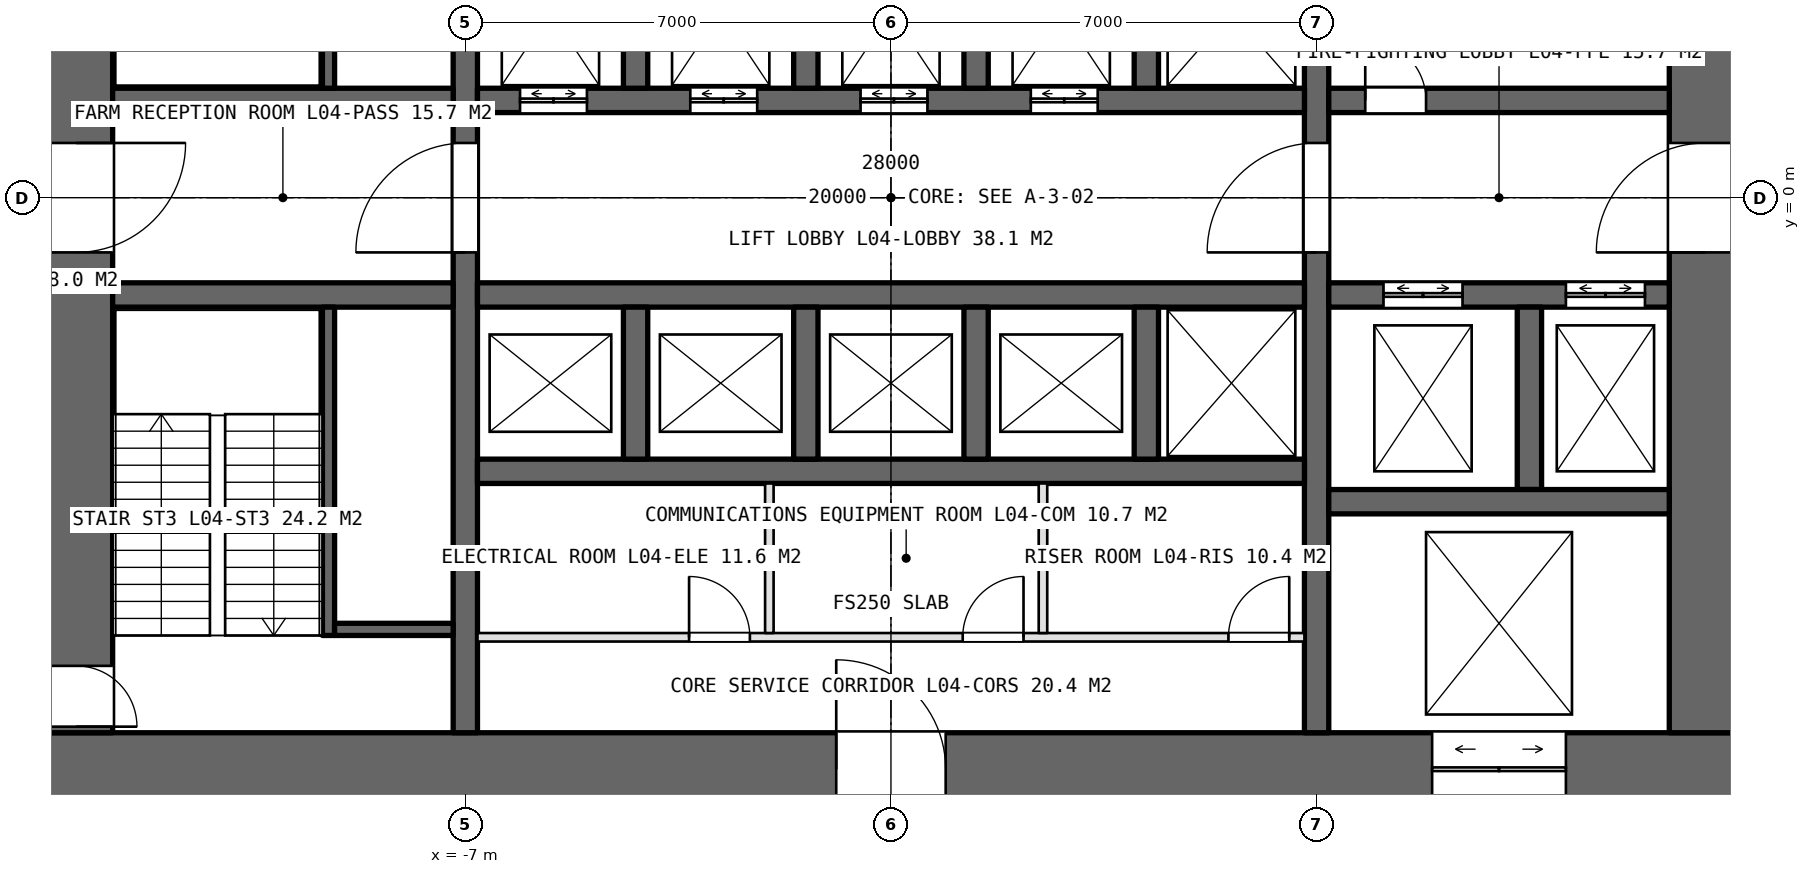
"""IFC4 building model, lengths in metres.
Left out: names, types, materials, properties, quantities, classifications, styles, units other than length and angle.
Written with IfcOpenShell. Run it as: python <this file> out.ifc"""

import sys

from ifc_helpers import new_model, si_unit, direction, frame, frame_2d, origin, place, context, subcontext, project, spatial, rectangle, extrude, element, fill, save


model = new_model("IFC4")
c1 = context("Model", 3, precision=1e-05, world=origin(), true_north=direction((0.0, 1.0)))
c2 = subcontext(c1, "Body", "Model", "MODEL_VIEW")
j1 = project(units=[si_unit("LENGTHUNIT", "METRE"), si_unit("PLANEANGLEUNIT", "RADIAN")], contexts=[c1])
p1 = place(None, origin())
s1 = spatial("IfcSite", under=j1, at=p1, CompositionType="ELEMENT")
p2 = place(p1, origin())
s2 = spatial("IfcBuilding", under=s1, at=p2, CompositionType="ELEMENT")
p3 = place(p2, frame((0.0, 0.0, 20.0)))
s3 = spatial("IfcBuildingStorey", under=s2, at=p3, CompositionType="ELEMENT", Elevation=20.0)
p4 = place(p3, frame((-14.0, -9.4, 0.0), z_axis=(0.0, 0.0, 1.0), x_axis=(1.0, 0.0, 0.0)))
e1 = element("IfcWall", 1, at=p4, inside=s3, PredefinedType="SHEAR", context=c2, shape_type="SweptSolid", body=[
    extrude(rectangle(XDim=28.0, YDim=1.2, at=frame_2d((14.0, 0.0))), origin(), (0.0, 0.0, 1.0), 5.0),
])
p5 = place(p4, frame((13.1, 0.0, 0.0)))
e2 = element("IfcOpeningElement", 2, at=p5, cuts=e1, PredefinedType="OPENING", context=c2, shape_type="SweptSolid", body=[
    extrude(rectangle(XDim=1.8, YDim=2.4, at=frame_2d((0.9, 1.2))), frame((0.0, 0.61, 0.0), z_axis=(0.0, -1.0, 0.0), x_axis=(1.0, 0.0, 0.0)), (0.0, 0.0, 1.0), 1.22),
])
p6 = place(p4, frame((22.9, 0.0, 0.0)))
e3 = element("IfcOpeningElement", 3, at=p6, cuts=e1, PredefinedType="OPENING", context=c2, shape_type="SweptSolid", body=[
    extrude(rectangle(XDim=2.2, YDim=2.7, at=frame_2d((1.1, 1.35))), frame((0.0, 0.61, 0.0), z_axis=(0.0, -1.0, 0.0), x_axis=(1.0, 0.0, 0.0)), (0.0, 0.0, 1.0), 1.22),
])
p7 = place(p3, frame((-13.4, 8.8, 0.0), z_axis=(0.0, 0.0, 1.0), x_axis=(0.0, -1.0, 0.0)))
e4 = element("IfcWall", 4, at=p7, inside=s3, PredefinedType="SHEAR", context=c2, shape_type="SweptSolid", body=[
    extrude(rectangle(XDim=17.6, YDim=1.2, at=frame_2d((8.8, 0.0))), origin(), (0.0, 0.0, 1.0), 5.0),
])
p8 = place(p7, frame((7.9, 0.0, 0.0)))
e5 = element("IfcOpeningElement", 5, at=p8, cuts=e4, PredefinedType="OPENING", context=c2, shape_type="SweptSolid", body=[
    extrude(rectangle(XDim=1.8, YDim=2.4, at=frame_2d((0.9, 1.2))), frame((0.0, 0.61, 0.0), z_axis=(0.0, -1.0, 0.0), x_axis=(1.0, 0.0, 0.0)), (0.0, 0.0, 1.0), 1.22),
])
p9 = place(p7, frame((16.5, 0.0, 0.0)))
e6 = element("IfcOpeningElement", 6, at=p9, cuts=e4, PredefinedType="OPENING", context=c2, shape_type="SweptSolid", body=[
    extrude(rectangle(XDim=1.0, YDim=2.4, at=frame_2d((0.5, 1.2))), frame((0.0, 0.61, 0.0), z_axis=(0.0, -1.0, 0.0), x_axis=(1.0, 0.0, 0.0)), (0.0, 0.0, 1.0), 1.22),
])
p10 = place(p3, frame((13.4, -8.8, 0.0), z_axis=(0.0, 0.0, 1.0), x_axis=(0.0, 1.0, 0.0)))
e7 = element("IfcWall", 7, at=p10, inside=s3, PredefinedType="SHEAR", context=c2, shape_type="SweptSolid", body=[
    extrude(rectangle(XDim=17.6, YDim=1.2, at=frame_2d((8.8, 0.0))), origin(), (0.0, 0.0, 1.0), 5.0),
])
p11 = place(p10, frame((7.9, 0.0, 0.0)))
e8 = element("IfcOpeningElement", 8, at=p11, cuts=e7, PredefinedType="OPENING", context=c2, shape_type="SweptSolid", body=[
    extrude(rectangle(XDim=1.8, YDim=2.4, at=frame_2d((0.9, 1.2))), frame((0.0, 0.61, 0.0), z_axis=(0.0, -1.0, 0.0), x_axis=(1.0, 0.0, 0.0)), (0.0, 0.0, 1.0), 1.22),
])
p12 = place(p3, frame((-7.0, -8.8, 0.0), z_axis=(0.0, 0.0, 1.0), x_axis=(0.0, 1.0, 0.0)))
e9 = element("IfcWall", 9, at=p12, inside=s3, PredefinedType="SHEAR", context=c2, shape_type="SweptSolid", body=[
    extrude(rectangle(XDim=17.6, YDim=0.4, at=frame_2d((8.8, 0.0))), origin(), (0.0, 0.0, 1.0), 5.0),
])
p13 = place(p12, frame((7.9, 0.0, 0.0)))
e10 = element("IfcOpeningElement", 10, at=p13, cuts=e9, PredefinedType="OPENING", context=c2, shape_type="SweptSolid", body=[
    extrude(rectangle(XDim=1.8, YDim=2.4, at=frame_2d((0.9, 1.2))), frame((0.0, 0.21, 0.0), z_axis=(0.0, -1.0, 0.0), x_axis=(1.0, 0.0, 0.0)), (0.0, 0.0, 1.0), 0.42),
])
p14 = place(p3, frame((7.0, -8.8, 0.0), z_axis=(0.0, 0.0, 1.0), x_axis=(0.0, 1.0, 0.0)))
e11 = element("IfcWall", 11, at=p14, inside=s3, PredefinedType="SHEAR", context=c2, shape_type="SweptSolid", body=[
    extrude(rectangle(XDim=17.6, YDim=0.4, at=frame_2d((8.8, 0.0))), origin(), (0.0, 0.0, 1.0), 5.0),
])
p15 = place(p14, frame((7.9, 0.0, 0.0)))
e12 = element("IfcOpeningElement", 12, at=p15, cuts=e11, PredefinedType="OPENING", context=c2, shape_type="SweptSolid", body=[
    extrude(rectangle(XDim=1.8, YDim=2.4, at=frame_2d((0.9, 1.2))), frame((0.0, 0.21, 0.0), z_axis=(0.0, -1.0, 0.0), x_axis=(1.0, 0.0, 0.0)), (0.0, 0.0, 1.0), 0.42),
])
p16 = place(p3, frame((-6.8, 1.6, 0.0), z_axis=(0.0, 0.0, 1.0), x_axis=(1.0, 0.0, 0.0)))
e13 = element("IfcWall", 13, at=p16, inside=s3, PredefinedType="SHEAR", context=c2, shape_type="SweptSolid", body=[
    extrude(rectangle(XDim=13.6, YDim=0.4, at=frame_2d((6.8, 0.0))), origin(), (0.0, 0.0, 1.0), 5.0),
])
p17 = place(p16, frame((0.7, 0.0, 0.0)))
e14 = element("IfcOpeningElement", 14, at=p17, cuts=e13, PredefinedType="OPENING", context=c2, shape_type="SweptSolid", body=[
    extrude(rectangle(XDim=1.1, YDim=2.4, at=frame_2d((0.55, 1.2))), frame((0.0, 0.21, 0.0), z_axis=(0.0, -1.0, 0.0), x_axis=(1.0, 0.0, 0.0)), (0.0, 0.0, 1.0), 0.42),
])
p18 = place(p16, frame((3.5, 0.0, 0.0)))
e15 = element("IfcOpeningElement", 15, at=p18, cuts=e13, PredefinedType="OPENING", context=c2, shape_type="SweptSolid", body=[
    extrude(rectangle(XDim=1.1, YDim=2.4, at=frame_2d((0.55, 1.2))), frame((0.0, 0.21, 0.0), z_axis=(0.0, -1.0, 0.0), x_axis=(1.0, 0.0, 0.0)), (0.0, 0.0, 1.0), 0.42),
])
p19 = place(p16, frame((6.3, 0.0, 0.0)))
e16 = element("IfcOpeningElement", 16, at=p19, cuts=e13, PredefinedType="OPENING", context=c2, shape_type="SweptSolid", body=[
    extrude(rectangle(XDim=1.1, YDim=2.4, at=frame_2d((0.55, 1.2))), frame((0.0, 0.21, 0.0), z_axis=(0.0, -1.0, 0.0), x_axis=(1.0, 0.0, 0.0)), (0.0, 0.0, 1.0), 0.42),
])
p20 = place(p16, frame((9.1, 0.0, 0.0)))
e17 = element("IfcOpeningElement", 17, at=p20, cuts=e13, PredefinedType="OPENING", context=c2, shape_type="SweptSolid", body=[
    extrude(rectangle(XDim=1.1, YDim=2.4, at=frame_2d((0.55, 1.2))), frame((0.0, 0.21, 0.0), z_axis=(0.0, -1.0, 0.0), x_axis=(1.0, 0.0, 0.0)), (0.0, 0.0, 1.0), 0.42),
])
for number, where, z_axis, x_axis in (
    (18, (-6.8, -1.6, 0.0), (0.0, 0.0, 1.0), (1.0, 0.0, 0.0)),
    (19, (-6.8, -4.5, 0.0), (0.0, 0.0, 1.0), (1.0, 0.0, 0.0)),
):
    element("IfcWall", number, at=place(p3, frame(where, z_axis=z_axis, x_axis=x_axis)), inside=s3, PredefinedType="SHEAR", context=c2, shape_type="SweptSolid", body=[
        extrude(rectangle(XDim=13.6, YDim=0.4, at=frame_2d((6.8, 0.0))), origin(), (0.0, 0.0, 1.0), 5.0),
    ])
for number, where, z_axis, x_axis in (
    (20, (-12.8, 1.6, 0.0), (0.0, 0.0, 1.0), (1.0, 0.0, 0.0)),
    (21, (-12.8, -1.6, 0.0), (0.0, 0.0, 1.0), (1.0, 0.0, 0.0)),
):
    element("IfcWall", number, at=place(p3, frame(where, z_axis=z_axis, x_axis=x_axis)), inside=s3, PredefinedType="SHEAR", context=c2, shape_type="SweptSolid", body=[
        extrude(rectangle(XDim=5.6, YDim=0.4, at=frame_2d((2.8, 0.0))), origin(), (0.0, 0.0, 1.0), 5.0),
    ])
p21 = place(p3, frame((7.2, 1.6, 0.0), z_axis=(0.0, 0.0, 1.0), x_axis=(1.0, 0.0, 0.0)))
e22 = element("IfcWall", 22, at=p21, inside=s3, PredefinedType="SHEAR", context=c2, shape_type="SweptSolid", body=[
    extrude(rectangle(XDim=5.6, YDim=0.4, at=frame_2d((2.8, 0.0))), origin(), (0.0, 0.0, 1.0), 5.0),
])
p22 = place(p21, frame((0.6, 0.0, 0.0)))
e23 = element("IfcOpeningElement", 23, at=p22, cuts=e22, PredefinedType="OPENING", context=c2, shape_type="SweptSolid", body=[
    extrude(rectangle(XDim=1.0, YDim=2.4, at=frame_2d((0.5, 1.2))), frame((0.0, 0.21, 0.0), z_axis=(0.0, -1.0, 0.0), x_axis=(1.0, 0.0, 0.0)), (0.0, 0.0, 1.0), 0.42),
])
p23 = place(p3, frame((7.2, -1.6, 0.0), z_axis=(0.0, 0.0, 1.0), x_axis=(1.0, 0.0, 0.0)))
e24 = element("IfcWall", 24, at=p23, inside=s3, PredefinedType="SHEAR", context=c2, shape_type="SweptSolid", body=[
    extrude(rectangle(XDim=5.6, YDim=0.4, at=frame_2d((2.8, 0.0))), origin(), (0.0, 0.0, 1.0), 5.0),
])
p24 = place(p23, frame((0.9, 0.0, 0.0)))
e25 = element("IfcOpeningElement", 25, at=p24, cuts=e24, PredefinedType="OPENING", context=c2, shape_type="SweptSolid", body=[
    extrude(rectangle(XDim=1.3, YDim=2.4, at=frame_2d((0.65, 1.2))), frame((0.0, 0.21, 0.0), z_axis=(0.0, -1.0, 0.0), x_axis=(1.0, 0.0, 0.0)), (0.0, 0.0, 1.0), 0.42),
])
p25 = place(p23, frame((3.9, 0.0, 0.0)))
e26 = element("IfcOpeningElement", 26, at=p25, cuts=e24, PredefinedType="OPENING", context=c2, shape_type="SweptSolid", body=[
    extrude(rectangle(XDim=1.3, YDim=2.4, at=frame_2d((0.65, 1.2))), frame((0.0, 0.21, 0.0), z_axis=(0.0, -1.0, 0.0), x_axis=(1.0, 0.0, 0.0)), (0.0, 0.0, 1.0), 0.42),
])
p26 = place(p3, frame((10.5, -4.8, 0.0), z_axis=(0.0, 0.0, 1.0), x_axis=(0.0, 1.0, 0.0)))
e27 = element("IfcWall", 27, at=p26, inside=s3, PredefinedType="SHEAR", context=c2, shape_type="SweptSolid", body=[
    extrude(rectangle(XDim=3.0, YDim=0.4, at=frame_2d((1.5, 0.0))), origin(), (0.0, 0.0, 1.0), 5.0),
])
p27 = place(p3, frame((7.2, -5.0, 0.0), z_axis=(0.0, 0.0, 1.0), x_axis=(1.0, 0.0, 0.0)))
e28 = element("IfcWall", 28, at=p27, inside=s3, PredefinedType="SHEAR", context=c2, shape_type="SweptSolid", body=[
    extrude(rectangle(XDim=5.6, YDim=0.4, at=frame_2d((2.8, 0.0))), origin(), (0.0, 0.0, 1.0), 5.0),
])
for number, where, z_axis, x_axis in (
    (29, (-4.2, 1.8, 0.0), (0.0, 0.0, 1.0), (0.0, 1.0, 0.0)),
    (30, (-4.2, -4.3, 0.0), (0.0, 0.0, 1.0), (0.0, 1.0, 0.0)),
    (31, (-1.4, 1.8, 0.0), (0.0, 0.0, 1.0), (0.0, 1.0, 0.0)),
    (32, (-1.4, -4.3, 0.0), (0.0, 0.0, 1.0), (0.0, 1.0, 0.0)),
    (33, (1.4, 1.8, 0.0), (0.0, 0.0, 1.0), (0.0, 1.0, 0.0)),
    (34, (1.4, -4.3, 0.0), (0.0, 0.0, 1.0), (0.0, 1.0, 0.0)),
    (35, (4.2, 1.8, 0.0), (0.0, 0.0, 1.0), (0.0, 1.0, 0.0)),
    (36, (4.2, -4.3, 0.0), (0.0, 0.0, 1.0), (0.0, 1.0, 0.0)),
):
    element("IfcWall", number, at=place(p3, frame(where, z_axis=z_axis, x_axis=x_axis)), inside=s3, PredefinedType="SHEAR", context=c2, shape_type="SweptSolid", body=[
        extrude(rectangle(XDim=2.5, YDim=0.4, at=frame_2d((1.25, 0.0))), origin(), (0.0, 0.0, 1.0), 5.0),
    ])
p28 = place(p3, frame((-6.8, -7.23, 0.0), z_axis=(0.0, 0.0, 1.0), x_axis=(1.0, 0.0, 0.0)))
e37 = element("IfcWall", 37, at=p28, inside=s3, PredefinedType="PARTITIONING", context=c2, shape_type="SweptSolid", body=[
    extrude(rectangle(XDim=13.6, YDim=0.14, at=frame_2d((6.8, 0.0))), origin(), (0.0, 0.0, 1.0), 4.75),
])
p29 = place(p28, frame((3.48, 0.0, 0.0)))
e38 = element("IfcOpeningElement", 38, at=p29, cuts=e37, PredefinedType="OPENING", context=c2, shape_type="SweptSolid", body=[
    extrude(rectangle(XDim=1.0, YDim=2.4, at=frame_2d((0.5, 1.2))), frame((0.0, 0.08, 0.0), z_axis=(0.0, -1.0, 0.0), x_axis=(1.0, 0.0, 0.0)), (0.0, 0.0, 1.0), 0.16),
])
p30 = place(p28, frame((7.98, 0.0, 0.0)))
e39 = element("IfcOpeningElement", 39, at=p30, cuts=e37, PredefinedType="OPENING", context=c2, shape_type="SweptSolid", body=[
    extrude(rectangle(XDim=1.0, YDim=2.4, at=frame_2d((0.5, 1.2))), frame((0.0, 0.08, 0.0), z_axis=(0.0, -1.0, 0.0), x_axis=(1.0, 0.0, 0.0)), (0.0, 0.0, 1.0), 0.16),
])
p31 = place(p28, frame((12.35, 0.0, 0.0)))
e40 = element("IfcOpeningElement", 40, at=p31, cuts=e37, PredefinedType="OPENING", context=c2, shape_type="SweptSolid", body=[
    extrude(rectangle(XDim=1.0, YDim=2.4, at=frame_2d((0.5, 1.2))), frame((0.0, 0.08, 0.0), z_axis=(0.0, -1.0, 0.0), x_axis=(1.0, 0.0, 0.0)), (0.0, 0.0, 1.0), 0.16),
])
for number, where, z_axis, x_axis in (
    (41, (-2.0, -4.7, 0.0), (0.0, 0.0, 1.0), (0.0, -1.0, 0.0)),
    (42, (2.5, -4.7, 0.0), (0.0, 0.0, 1.0), (0.0, -1.0, 0.0)),
):
    element("IfcWall", number, at=place(p3, frame(where, z_axis=z_axis, x_axis=x_axis)), inside=s3, PredefinedType="PARTITIONING", context=c2, shape_type="SweptSolid", body=[
        extrude(rectangle(XDim=2.46, YDim=0.14, at=frame_2d((1.23, 0.0))), origin(), (0.0, 0.0, 1.0), 4.75),
    ])
for number, where, z_axis, x_axis in (
    (43, (-9.25, 7.2, 0.0), (0.0, 0.0, 1.0), (0.0, -1.0, 0.0)),
    (44, (-9.25, -7.2, 0.0), (0.0, 0.0, 1.0), (0.0, 1.0, 0.0)),
):
    element("IfcWall", number, at=place(p3, frame(where, z_axis=z_axis, x_axis=x_axis)), inside=s3, PredefinedType="SOLIDWALL", context=c2, shape_type="SweptSolid", body=[
        extrude(rectangle(XDim=5.4, YDim=0.2, at=frame_2d((2.7, 0.0))), origin(), (0.0, 0.0, 1.0), 5.0),
    ])
p32 = place(p3, frame((-9.15, -7.1, 0.0), z_axis=(0.0, 0.0, 1.0), x_axis=(1.0, 0.0, 0.0)))
e45 = element("IfcWall", 45, at=p32, inside=s3, PredefinedType="SOLIDWALL", context=c2, shape_type="SweptSolid", body=[
    extrude(rectangle(XDim=1.95, YDim=0.2, at=frame_2d((0.975, 0.0))), origin(), (0.0, 0.0, 1.0), 5.0),
])
p33 = place(p8, origin())
e46 = element("IfcDoor", 46, at=p33, inside=s3, OperationType="DOUBLE_DOOR_SINGLE_SWING", PredefinedType="DOOR", context=c2, shape_type="SweptSolid", body=[
    extrude(rectangle(XDim=1.8, YDim=2.4, at=frame_2d((0.9, 1.2))), frame((0.0, 0.025, 0.0), z_axis=(0.0, -1.0, 0.0), x_axis=(1.0, 0.0, 0.0)), (0.0, 0.0, 1.0), 0.05),
])
fill(e5, e46)
p34 = place(p11, origin())
e47 = element("IfcDoor", 47, at=p34, inside=s3, OperationType="DOUBLE_DOOR_SINGLE_SWING", PredefinedType="DOOR", context=c2, shape_type="SweptSolid", body=[
    extrude(rectangle(XDim=1.8, YDim=2.4, at=frame_2d((0.9, 1.2))), frame((0.0, 0.025, 0.0), z_axis=(0.0, -1.0, 0.0), x_axis=(1.0, 0.0, 0.0)), (0.0, 0.0, 1.0), 0.05),
])
fill(e8, e47)
p35 = place(p13, origin())
e48 = element("IfcDoor", 48, at=p35, inside=s3, OperationType="DOUBLE_DOOR_SINGLE_SWING", PredefinedType="DOOR", context=c2, shape_type="SweptSolid", body=[
    extrude(rectangle(XDim=1.8, YDim=2.4, at=frame_2d((0.9, 1.2))), frame((0.0, 0.025, 0.0), z_axis=(0.0, -1.0, 0.0), x_axis=(1.0, 0.0, 0.0)), (0.0, 0.0, 1.0), 0.05),
])
fill(e10, e48)
p36 = place(p15, origin())
e49 = element("IfcDoor", 49, at=p36, inside=s3, OperationType="DOUBLE_DOOR_SINGLE_SWING", PredefinedType="DOOR", context=c2, shape_type="SweptSolid", body=[
    extrude(rectangle(XDim=1.8, YDim=2.4, at=frame_2d((0.9, 1.2))), frame((0.0, 0.025, 0.0), z_axis=(0.0, -1.0, 0.0), x_axis=(1.0, 0.0, 0.0)), (0.0, 0.0, 1.0), 0.05),
])
fill(e12, e49)
p37 = place(p9, origin())
e50 = element("IfcDoor", 50, at=p37, inside=s3, OperationType="SINGLE_SWING_RIGHT", PredefinedType="DOOR", context=c2, shape_type="SweptSolid", body=[
    extrude(rectangle(XDim=1.0, YDim=2.4, at=frame_2d((0.5, 1.2))), frame((0.0, 0.025, 0.0), z_axis=(0.0, -1.0, 0.0), x_axis=(1.0, 0.0, 0.0)), (0.0, 0.0, 1.0), 0.05),
])
fill(e6, e50)
p38 = place(p22, origin())
e51 = element("IfcDoor", 51, at=p38, inside=s3, OperationType="SINGLE_SWING_LEFT", PredefinedType="DOOR", context=c2, shape_type="SweptSolid", body=[
    extrude(rectangle(XDim=1.0, YDim=2.4, at=frame_2d((0.5, 1.2))), frame((0.0, 0.025, 0.0), z_axis=(0.0, -1.0, 0.0), x_axis=(1.0, 0.0, 0.0)), (0.0, 0.0, 1.0), 0.05),
])
fill(e23, e51)
p39 = place(p29, origin())
e52 = element("IfcDoor", 52, at=p39, inside=s3, OperationType="SINGLE_SWING_LEFT", PredefinedType="DOOR", context=c2, shape_type="SweptSolid", body=[
    extrude(rectangle(XDim=1.0, YDim=2.4, at=frame_2d((0.5, 1.2))), frame((0.0, 0.025, 0.0), z_axis=(0.0, -1.0, 0.0), x_axis=(1.0, 0.0, 0.0)), (0.0, 0.0, 1.0), 0.05),
])
fill(e38, e52)
p40 = place(p30, origin())
e53 = element("IfcDoor", 53, at=p40, inside=s3, OperationType="SINGLE_SWING_RIGHT", PredefinedType="DOOR", context=c2, shape_type="SweptSolid", body=[
    extrude(rectangle(XDim=1.0, YDim=2.4, at=frame_2d((0.5, 1.2))), frame((0.0, 0.025, 0.0), z_axis=(0.0, -1.0, 0.0), x_axis=(1.0, 0.0, 0.0)), (0.0, 0.0, 1.0), 0.05),
])
fill(e39, e53)
p41 = place(p31, origin())
e54 = element("IfcDoor", 54, at=p41, inside=s3, OperationType="SINGLE_SWING_RIGHT", PredefinedType="DOOR", context=c2, shape_type="SweptSolid", body=[
    extrude(rectangle(XDim=1.0, YDim=2.4, at=frame_2d((0.5, 1.2))), frame((0.0, 0.025, 0.0), z_axis=(0.0, -1.0, 0.0), x_axis=(1.0, 0.0, 0.0)), (0.0, 0.0, 1.0), 0.05),
])
fill(e40, e54)
p42 = place(p5, origin())
e55 = element("IfcDoor", 55, at=p42, inside=s3, OperationType="DOUBLE_DOOR_SINGLE_SWING", PredefinedType="DOOR", context=c2, shape_type="SweptSolid", body=[
    extrude(rectangle(XDim=1.8, YDim=2.4, at=frame_2d((0.9, 1.2))), frame((0.0, 0.025, 0.0), z_axis=(0.0, -1.0, 0.0), x_axis=(1.0, 0.0, 0.0)), (0.0, 0.0, 1.0), 0.05),
])
fill(e2, e55)
p43 = place(p17, origin())
e56 = element("IfcDoor", 56, at=p43, inside=s3, OperationType="DOUBLE_DOOR_SLIDING", PredefinedType="DOOR", context=c2, shape_type="SweptSolid", body=[
    extrude(rectangle(XDim=1.1, YDim=2.4, at=frame_2d((0.55, 1.2))), frame((0.0, 0.025, 0.0), z_axis=(0.0, -1.0, 0.0), x_axis=(1.0, 0.0, 0.0)), (0.0, 0.0, 1.0), 0.05),
])
fill(e14, e56)
p44 = place(p18, origin())
e57 = element("IfcDoor", 57, at=p44, inside=s3, OperationType="DOUBLE_DOOR_SLIDING", PredefinedType="DOOR", context=c2, shape_type="SweptSolid", body=[
    extrude(rectangle(XDim=1.1, YDim=2.4, at=frame_2d((0.55, 1.2))), frame((0.0, 0.025, 0.0), z_axis=(0.0, -1.0, 0.0), x_axis=(1.0, 0.0, 0.0)), (0.0, 0.0, 1.0), 0.05),
])
fill(e15, e57)
p45 = place(p19, origin())
e58 = element("IfcDoor", 58, at=p45, inside=s3, OperationType="DOUBLE_DOOR_SLIDING", PredefinedType="DOOR", context=c2, shape_type="SweptSolid", body=[
    extrude(rectangle(XDim=1.1, YDim=2.4, at=frame_2d((0.55, 1.2))), frame((0.0, 0.025, 0.0), z_axis=(0.0, -1.0, 0.0), x_axis=(1.0, 0.0, 0.0)), (0.0, 0.0, 1.0), 0.05),
])
fill(e16, e58)
p46 = place(p20, origin())
e59 = element("IfcDoor", 59, at=p46, inside=s3, OperationType="DOUBLE_DOOR_SLIDING", PredefinedType="DOOR", context=c2, shape_type="SweptSolid", body=[
    extrude(rectangle(XDim=1.1, YDim=2.4, at=frame_2d((0.55, 1.2))), frame((0.0, 0.025, 0.0), z_axis=(0.0, -1.0, 0.0), x_axis=(1.0, 0.0, 0.0)), (0.0, 0.0, 1.0), 0.05),
])
fill(e17, e59)
p47 = place(p24, origin())
e60 = element("IfcDoor", 60, at=p47, inside=s3, OperationType="DOUBLE_DOOR_SLIDING", PredefinedType="DOOR", context=c2, shape_type="SweptSolid", body=[
    extrude(rectangle(XDim=1.3, YDim=2.4, at=frame_2d((0.65, 1.2))), frame((0.0, 0.025, 0.0), z_axis=(0.0, -1.0, 0.0), x_axis=(1.0, 0.0, 0.0)), (0.0, 0.0, 1.0), 0.05),
])
fill(e25, e60)
p48 = place(p25, origin())
e61 = element("IfcDoor", 61, at=p48, inside=s3, OperationType="DOUBLE_DOOR_SLIDING", PredefinedType="DOOR", context=c2, shape_type="SweptSolid", body=[
    extrude(rectangle(XDim=1.3, YDim=2.4, at=frame_2d((0.65, 1.2))), frame((0.0, 0.025, 0.0), z_axis=(0.0, -1.0, 0.0), x_axis=(1.0, 0.0, 0.0)), (0.0, 0.0, 1.0), 0.05),
])
fill(e26, e61)
p49 = place(p6, origin())
e62 = element("IfcDoor", 62, at=p49, inside=s3, OperationType="DOUBLE_DOOR_SLIDING", PredefinedType="DOOR", context=c2, shape_type="SweptSolid", body=[
    extrude(rectangle(XDim=2.2, YDim=2.7, at=frame_2d((1.1, 1.35))), frame((0.0, 0.025, 0.0), z_axis=(0.0, -1.0, 0.0), x_axis=(1.0, 0.0, 0.0)), (0.0, 0.0, 1.0), 0.05),
])
fill(e3, e62)
save(model, sys.argv[1])
